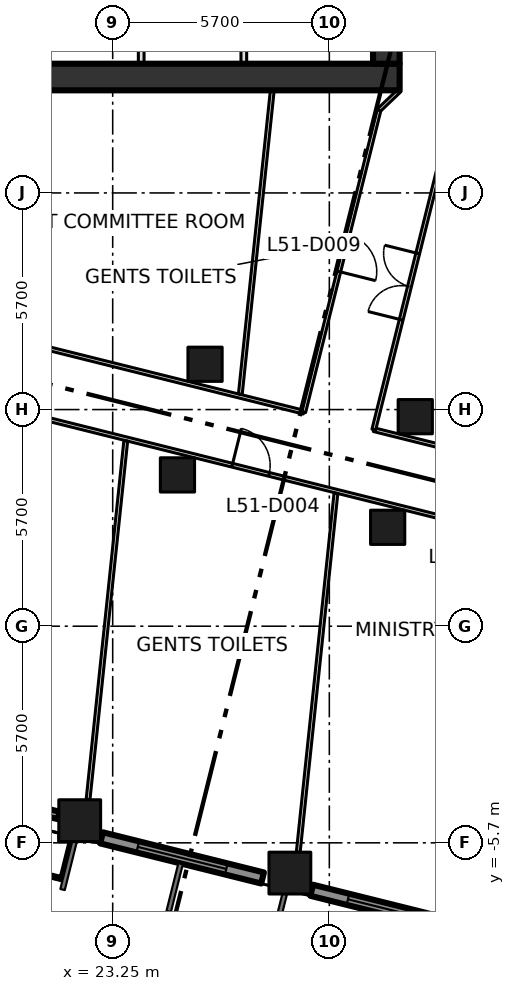
"""IFC4 building model, lengths in metres.
Left out: names, types, materials, properties, quantities, classifications, styles, units other than length and angle.
Written with IfcOpenShell. Run it as: python <this file> out.ifc"""

import sys

from ifc_helpers import new_model, si_unit, direction, frame, frame_2d, origin, origin_2d, place, context, subcontext, project, spatial, rectangle, extrude, element, fill, save


model = new_model("IFC4")
c1 = context("Model", 3, precision=1e-05, world=origin(), true_north=direction((0.0, 1.0)))
c2 = subcontext(c1, "Body", "Model", "MODEL_VIEW")
j1 = project(units=[si_unit("LENGTHUNIT", "METRE"), si_unit("PLANEANGLEUNIT", "RADIAN")], contexts=[c1])
p1 = place(None, origin())
s1 = spatial("IfcSite", under=j1, at=p1, CompositionType="ELEMENT")
p2 = place(p1, origin())
s2 = spatial("IfcBuilding", under=s1, at=p2, CompositionType="ELEMENT")
p3 = place(p2, frame((0.0, 0.0, 225.6)))
s3 = spatial("IfcBuildingStorey", under=s2, at=p3, CompositionType="ELEMENT", Elevation=225.6)
for number, where, z_axis, x_axis in (
    (1, (22.382, -5.117, 0.0), (0.0, 0.0, 1.0), (1.0, 0.0, 0.0)),
    (2, (27.912, -6.496, 0.0), (0.0, 0.0, 1.0), (1.0, 0.0, 0.0)),
):
    element("IfcColumn", number, at=place(p3, frame(where, z_axis=z_axis, x_axis=x_axis)), inside=s3, PredefinedType="COLUMN", context=c2, shape_type="SweptSolid", body=[
        extrude(rectangle(XDim=1.1, YDim=1.1, at=origin_2d()), origin(), (0.0, 0.0, 1.0), 4.2),
    ])
for number, where, z_axis, x_axis in (
    (3, (24.954, 3.981, 0.0), (0.0, 0.0, 1.0), (1.0, 0.0, 0.0)),
    (4, (30.485, 2.602, 0.0), (0.0, 0.0, 1.0), (1.0, 0.0, 0.0)),
    (5, (25.68, 6.892, 0.0), (0.0, 0.0, 1.0), (1.0, 0.0, 0.0)),
    (6, (31.211, 5.513, 0.0), (0.0, 0.0, 1.0), (1.0, 0.0, 0.0)),
):
    element("IfcColumn", number, at=place(p3, frame(where, z_axis=z_axis, x_axis=x_axis)), inside=s3, PredefinedType="COLUMN", context=c2, shape_type="SweptSolid", body=[
        extrude(rectangle(XDim=0.9, YDim=0.9, at=origin_2d()), origin(), (0.0, 0.0, 1.0), 4.2),
    ])
p4 = place(p3, frame((8.0, 14.45, -0.3), z_axis=(0.0, 0.0, 1.0), x_axis=(1.0, 0.0, 0.0)))
e7 = element("IfcWall", 7, at=p4, inside=s3, PredefinedType="SHEAR", context=c2, shape_type="SweptSolid", body=[
    extrude(rectangle(XDim=22.8, YDim=0.7, at=frame_2d((11.4, 0.0))), origin(), (0.0, 0.0, 1.0), 4.2),
])
p5 = place(p4, frame((2.3, 0.0, 0.3)))
e8 = element("IfcOpeningElement", 8, at=p5, cuts=e7, PredefinedType="OPENING", context=c2, shape_type="SweptSolid", body=[
    extrude(rectangle(XDim=1.8, YDim=2.1, at=frame_2d((0.9, 1.05))), frame((0.0, 0.36, 0.0), z_axis=(0.0, -1.0, 0.0), x_axis=(1.0, 0.0, 0.0)), (0.0, 0.0, 1.0), 0.72),
])
p6 = place(p3, frame((30.45, 14.8, -0.3), z_axis=(0.0, 0.0, 1.0), x_axis=(0.0, 1.0, 0.0)))
e9 = element("IfcWall", 9, at=p6, inside=s3, PredefinedType="SHEAR", context=c2, shape_type="SweptSolid", body=[
    extrude(rectangle(XDim=20.9, YDim=0.7, at=frame_2d((10.45, 0.0))), origin(), (0.0, 0.0, 1.0), 4.2),
])
for number, where, z_axis, x_axis in (
    (10, (24.0, 14.8, 0.0), (0.0, 0.0, 1.0), (0.0, 1.0, 0.0)),
    (11, (26.7, 14.8, 0.0), (0.0, 0.0, 1.0), (0.0, 1.0, 0.0)),
):
    element("IfcWall", number, at=place(p3, frame(where, z_axis=z_axis, x_axis=x_axis)), inside=s3, PredefinedType="PARTITIONING", context=c2, shape_type="SweptSolid", body=[
        extrude(rectangle(XDim=2.825, YDim=0.15, at=frame_2d((1.413, 0.0))), origin(), (0.0, 0.0, 1.0), 3.9),
    ])
p7 = place(p3, frame((17.401, -3.875, 0.0), z_axis=(0.0, 0.0, 1.0), x_axis=(0.970286982272, -0.241956963183, 0.0)))
e12 = element("IfcWall", 12, at=p7, inside=s3, PredefinedType="SOLIDWALL", context=c2, shape_type="SweptSolid", body=[
    extrude(rectangle(XDim=4.567, YDim=0.2, at=frame_2d((2.283, 0.0))), origin(), (0.0, 0.0, 1.0), 3.15),
])
p8 = place(p7, frame((1.383, 0.0, 0.0)))
e13 = element("IfcOpeningElement", 13, at=p8, cuts=e12, PredefinedType="OPENING", context=c2, shape_type="SweptSolid", body=[
    extrude(rectangle(XDim=1.8, YDim=2.9, at=frame_2d((0.9, 1.45))), frame((0.0, 0.11, 0.0), z_axis=(0.0, -1.0, 0.0), x_axis=(1.0, 0.0, 0.0)), (0.0, 0.0, 1.0), 0.22),
])
p9 = place(p3, frame((16.694, -5.069, 0.0), z_axis=(0.0, 0.0, 1.0), x_axis=(0.970289679319, -0.241946147329, 0.0)))
e14 = element("IfcWall", 14, at=p9, inside=s3, PredefinedType="SOLIDWALL", context=c2, shape_type="SweptSolid", body=[
    extrude(rectangle(XDim=5.36, YDim=0.4, at=frame_2d((2.68, 0.0))), origin(), (0.0, 0.0, 1.0), 0.3),
])
p10 = place(p3, frame((22.956, -5.569, 0.0), z_axis=(0.0, 0.0, 1.0), x_axis=(0.970323116569, -0.241812012628, 0.0)))
e15 = element("IfcWall", 15, at=p10, inside=s3, PredefinedType="SOLIDWALL", context=c2, shape_type="SweptSolid", body=[
    extrude(rectangle(XDim=4.367, YDim=0.3, at=frame_2d((2.183, 0.0))), origin(), (0.0, 0.0, 1.0), 3.15),
])
p11 = place(p10, frame((0.983, 0.0, 0.8)))
e16 = element("IfcOpeningElement", 16, at=p11, cuts=e15, PredefinedType="OPENING", context=c2, shape_type="SweptSolid", body=[
    extrude(rectangle(XDim=2.4, YDim=2.1, at=frame_2d((1.2, 1.05))), frame((0.0, 0.16, 0.0), z_axis=(0.0, -1.0, 0.0), x_axis=(1.0, 0.0, 0.0)), (0.0, 0.0, 1.0), 0.32),
])
p12 = place(p3, frame((28.486, -6.948, 0.0), z_axis=(0.0, 0.0, 1.0), x_axis=(0.970336189295, -0.241759549438, 0.0)))
e17 = element("IfcWall", 17, at=p12, inside=s3, PredefinedType="SOLIDWALL", context=c2, shape_type="SweptSolid", body=[
    extrude(rectangle(XDim=4.368, YDim=0.3, at=frame_2d((2.184, 0.0))), origin(), (0.0, 0.0, 1.0), 3.15),
])
p13 = place(p12, frame((0.983, 0.0, 0.8)))
e18 = element("IfcOpeningElement", 18, at=p13, cuts=e17, PredefinedType="OPENING", context=c2, shape_type="SweptSolid", body=[
    extrude(rectangle(XDim=2.4, YDim=2.1, at=frame_2d((1.2, 1.05))), frame((0.0, 0.16, 0.0), z_axis=(0.0, -1.0, 0.0), x_axis=(1.0, 0.0, 0.0)), (0.0, 0.0, 1.0), 0.32),
])
p14 = place(p3, frame((8.55, 8.685, 0.0), z_axis=(0.0, 0.0, 1.0), x_axis=(0.970297101369, -0.241916380335, 0.0)))
e19 = element("IfcWall", 19, at=p14, inside=s3, PredefinedType="PARTITIONING", context=c2, shape_type="SweptSolid", body=[
    extrude(rectangle(XDim=51.675, YDim=0.1, at=frame_2d((25.837, 0.0))), origin(), (0.0, 0.0, 1.0), 3.9),
])
p15 = place(p14, frame((18.391, 0.0, 0.0)))
e20 = element("IfcOpeningElement", 20, at=p15, cuts=e19, PredefinedType="OPENING", context=c2, shape_type="SweptSolid", body=[
    extrude(rectangle(XDim=1.0, YDim=2.1, at=frame_2d((0.5, 1.05))), frame((0.0, 0.06, 0.0), z_axis=(0.0, -1.0, 0.0), x_axis=(1.0, 0.0, 0.0)), (0.0, 0.0, 1.0), 0.12),
])
p16 = place(p14, frame((24.69, 0.0, 0.0)))
e21 = element("IfcOpeningElement", 21, at=p16, cuts=e19, PredefinedType="OPENING", context=c2, shape_type="SweptSolid", body=[
    extrude(rectangle(XDim=1.0, YDim=2.1, at=frame_2d((0.5, 1.05))), frame((0.0, 0.06, 0.0), z_axis=(0.0, -1.0, 0.0), x_axis=(1.0, 0.0, 0.0)), (0.0, 0.0, 1.0), 0.12),
])
p17 = place(p14, frame((29.99, 0.0, 0.0)))
e22 = element("IfcOpeningElement", 22, at=p17, cuts=e19, PredefinedType="OPENING", context=c2, shape_type="SweptSolid", body=[
    extrude(rectangle(XDim=1.8, YDim=2.1, at=frame_2d((0.9, 1.05))), frame((0.0, 0.06, 0.0), z_axis=(0.0, -1.0, 0.0), x_axis=(1.0, 0.0, 0.0)), (0.0, 0.0, 1.0), 0.12),
])
p18 = place(p14, frame((6.58, 0.0, 0.0)))
e23 = element("IfcOpeningElement", 23, at=p18, cuts=e19, PredefinedType="OPENING", context=c2, shape_type="SweptSolid", body=[
    extrude(rectangle(XDim=1.8, YDim=2.1, at=frame_2d((0.9, 1.05))), frame((0.0, 0.06, 0.0), z_axis=(0.0, -1.0, 0.0), x_axis=(1.0, 0.0, 0.0)), (0.0, 0.0, 1.0), 0.12),
])
p19 = place(p3, frame((8.988, 10.44, 0.0), z_axis=(0.0, 0.0, 1.0), x_axis=(0.970301223092, -0.241899848006, 0.0)))
e24 = element("IfcWall", 24, at=p19, inside=s3, PredefinedType="PARTITIONING", context=c2, shape_type="SweptSolid", body=[
    extrude(rectangle(XDim=19.879, YDim=0.1, at=frame_2d((9.94, 0.0))), origin(), (0.0, 0.0, 1.0), 3.9),
])
p20 = place(p3, frame((30.12, 5.171, 0.0), z_axis=(0.0, 0.0, 1.0), x_axis=(0.970303642594, -0.241890142767, 0.0)))
e25 = element("IfcWall", 25, at=p20, inside=s3, PredefinedType="PARTITIONING", context=c2, shape_type="SweptSolid", body=[
    extrude(rectangle(XDim=20.026, YDim=0.1, at=frame_2d((10.013, 0.0))), origin(), (0.0, 0.0, 1.0), 3.9),
])
p21 = place(p3, frame((30.12, 5.171, 0.0), z_axis=(0.0, 0.0, 1.0), x_axis=(0.241902913229, 0.970300458915, 0.0)))
e26 = element("IfcWall", 26, at=p21, inside=s3, PredefinedType="PARTITIONING", context=c2, shape_type="SweptSolid", body=[
    extrude(rectangle(XDim=8.172, YDim=0.1, at=frame_2d((4.086, 0.0))), origin(), (0.0, 0.0, 1.0), 3.9),
])
p22 = place(p21, frame((2.98, 0.0, 0.0)))
e27 = element("IfcOpeningElement", 27, at=p22, cuts=e26, PredefinedType="OPENING", context=c2, shape_type="SweptSolid", body=[
    extrude(rectangle(XDim=1.8, YDim=2.1, at=frame_2d((0.9, 1.05))), frame((0.0, 0.06, 0.0), z_axis=(0.0, -1.0, 0.0), x_axis=(1.0, 0.0, 0.0)), (0.0, 0.0, 1.0), 0.12),
])
p23 = place(p3, frame((30.259, 13.583, 0.0), z_axis=(0.0, 0.0, 1.0), x_axis=(-0.241841612879, -0.970315739479, 0.0)))
e28 = element("IfcWall", 28, at=p23, inside=s3, PredefinedType="PARTITIONING", context=c2, shape_type="SweptSolid", body=[
    extrude(rectangle(XDim=8.195, YDim=0.1, at=frame_2d((4.098, 0.0))), origin(), (0.0, 0.0, 1.0), 3.9),
])
p24 = place(p23, frame((3.38, 0.0, 0.0)))
e29 = element("IfcOpeningElement", 29, at=p24, cuts=e28, PredefinedType="OPENING", context=c2, shape_type="SweptSolid", body=[
    extrude(rectangle(XDim=1.0, YDim=2.1, at=frame_2d((0.5, 1.05))), frame((0.0, 0.06, 0.0), z_axis=(0.0, -1.0, 0.0), x_axis=(1.0, 0.0, 0.0)), (0.0, 0.0, 1.0), 0.12),
])
p25 = place(p3, frame((30.8, 14.1, 0.0), z_axis=(0.0, 0.0, 1.0), x_axis=(-0.722911025189, -0.690941133281, 0.0)))
e30 = element("IfcWall", 30, at=p25, inside=s3, PredefinedType="PARTITIONING", context=c2, shape_type="SweptSolid", body=[
    extrude(rectangle(XDim=0.748, YDim=0.1, at=frame_2d((0.374, 0.0))), origin(), (0.0, 0.0, 1.0), 3.9),
])
p26 = place(p3, frame((22.601, -4.567, 0.0), z_axis=(0.0, 0.0, 1.0), x_axis=(0.104573690763, 0.994517140727, 0.0)))
e31 = element("IfcWall", 31, at=p26, inside=s3, PredefinedType="PARTITIONING", context=c2, shape_type="SweptSolid", body=[
    extrude(rectangle(XDim=9.495, YDim=0.1, at=frame_2d((4.748, 0.0))), origin(), (0.0, 0.0, 1.0), 3.9),
])
p27 = place(p3, frame((26.608, 6.105, 0.0), z_axis=(0.0, 0.0, 1.0), x_axis=(0.104619970127, 0.994512273353, 0.0)))
e32 = element("IfcWall", 32, at=p27, inside=s3, PredefinedType="PARTITIONING", context=c2, shape_type="SweptSolid", body=[
    extrude(rectangle(XDim=8.039, YDim=0.1, at=frame_2d((4.02, 0.0))), origin(), (0.0, 0.0, 1.0), 3.9),
])
p28 = place(p3, frame((28.132, -5.946, 0.0), z_axis=(0.0, 0.0, 1.0), x_axis=(0.104469291407, 0.994528112802, 0.0)))
e33 = element("IfcWall", 33, at=p28, inside=s3, PredefinedType="PARTITIONING", context=c2, shape_type="SweptSolid", body=[
    extrude(rectangle(XDim=9.495, YDim=0.1, at=frame_2d((4.748, 0.0))), origin(), (0.0, 0.0, 1.0), 3.9),
])
p29 = place(p11, origin())
e34 = element("IfcWindow", 34, at=p29, inside=s3, PartitioningType="DOUBLE_PANEL_VERTICAL", PredefinedType="WINDOW", context=c2, shape_type="SweptSolid", body=[
    extrude(rectangle(XDim=2.4, YDim=2.1, at=frame_2d((1.2, 1.05))), frame((0.0, 0.03, 0.0), z_axis=(0.0, -1.0, 0.0), x_axis=(1.0, 0.0, 0.0)), (0.0, 0.0, 1.0), 0.06),
])
fill(e16, e34)
p30 = place(p13, origin())
e35 = element("IfcWindow", 35, at=p30, inside=s3, PartitioningType="DOUBLE_PANEL_VERTICAL", PredefinedType="WINDOW", context=c2, shape_type="SweptSolid", body=[
    extrude(rectangle(XDim=2.4, YDim=2.1, at=frame_2d((1.2, 1.05))), frame((0.0, 0.03, 0.0), z_axis=(0.0, -1.0, 0.0), x_axis=(1.0, 0.0, 0.0)), (0.0, 0.0, 1.0), 0.06),
])
fill(e18, e35)
p31 = place(p15, origin())
e36 = element("IfcDoor", 36, at=p31, inside=s3, OperationType="SINGLE_SWING_LEFT", PredefinedType="DOOR", context=c2, shape_type="SweptSolid", body=[
    extrude(rectangle(XDim=1.0, YDim=2.1, at=frame_2d((0.5, 1.05))), frame((0.0, 0.025, 0.0), z_axis=(0.0, -1.0, 0.0), x_axis=(1.0, 0.0, 0.0)), (0.0, 0.0, 1.0), 0.05),
])
fill(e20, e36)
p32 = place(p24, origin())
e37 = element("IfcDoor", 37, at=p32, inside=s3, OperationType="SINGLE_SWING_RIGHT", PredefinedType="DOOR", context=c2, shape_type="SweptSolid", body=[
    extrude(rectangle(XDim=1.0, YDim=2.1, at=frame_2d((0.5, 1.05))), frame((0.0, 0.025, 0.0), z_axis=(0.0, -1.0, 0.0), x_axis=(1.0, 0.0, 0.0)), (0.0, 0.0, 1.0), 0.05),
])
fill(e29, e37)
p33 = place(p22, origin())
e38 = element("IfcDoor", 38, at=p33, inside=s3, OperationType="DOUBLE_DOOR_SINGLE_SWING", PredefinedType="DOOR", context=c2, shape_type="SweptSolid", body=[
    extrude(rectangle(XDim=1.8, YDim=2.1, at=frame_2d((0.9, 1.05))), frame((0.0, 0.025, 0.0), z_axis=(0.0, -1.0, 0.0), x_axis=(1.0, 0.0, 0.0)), (0.0, 0.0, 1.0), 0.05),
])
fill(e27, e38)
save(model, sys.argv[1])
